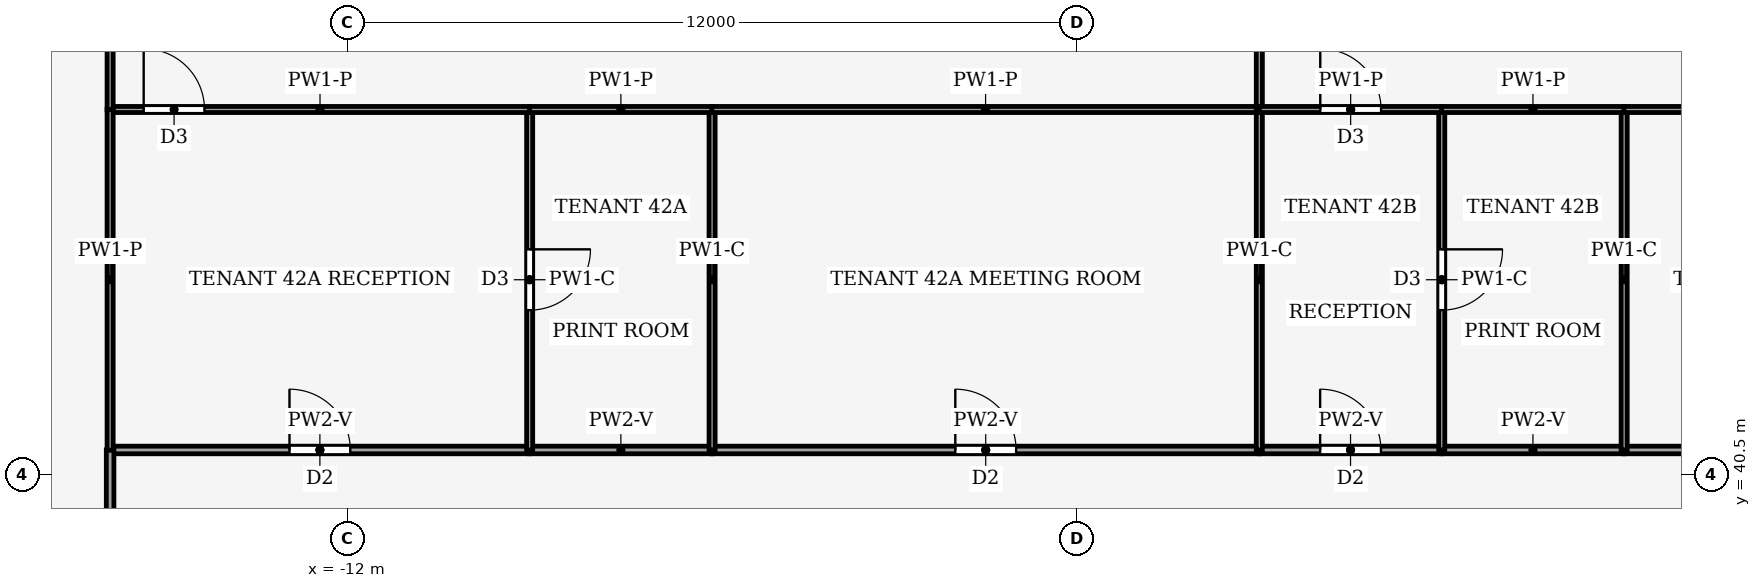
"""IFC4 building model, lengths in metres.
Left out: names, types, materials, properties, quantities, classifications, styles, units other than length and angle.
Written with IfcOpenShell. Run it as: python <this file> out.ifc"""

import sys

from ifc_helpers import new_model, si_unit, direction, frame, frame_2d, origin, place, context, subcontext, project, spatial, rectangle, extrude, element, fill, save


model = new_model("IFC4")
c1 = context("Model", 3, precision=1e-05, world=origin(), true_north=direction((0.0, 1.0)))
c2 = subcontext(c1, "Body", "Model", "MODEL_VIEW")
j1 = project(units=[si_unit("LENGTHUNIT", "METRE"), si_unit("PLANEANGLEUNIT", "RADIAN")], contexts=[c1])
p1 = place(None, origin())
s1 = spatial("IfcSite", under=j1, at=p1, CompositionType="ELEMENT")
p2 = place(p1, origin())
s2 = spatial("IfcBuilding", under=s1, at=p2, CompositionType="ELEMENT")
p3 = place(p2, frame((0.0, 0.0, 186.0)))
s3 = spatial("IfcBuildingStorey", under=s2, at=p3, CompositionType="ELEMENT", Elevation=186.0)
p4 = place(p3, frame((-15.9, 40.9, 0.0), z_axis=(0.0, 0.0, 1.0), x_axis=(1.0, 0.0, 0.0)))
e1 = element("IfcWall", 1, at=p4, inside=s3, PredefinedType="PARTITIONING", context=c2, shape_type="SweptSolid", body=[
    extrude(rectangle(XDim=6.9, YDim=0.125, at=frame_2d((3.45, 0.0))), origin(), (0.0, 0.0, 1.0), 3.44),
])
p5 = place(p4, frame((2.95, 0.0, 0.0)))
e2 = element("IfcOpeningElement", 2, at=p5, cuts=e1, PredefinedType="OPENING", context=c2, shape_type="SweptSolid", body=[
    extrude(rectangle(XDim=1.0, YDim=2.1, at=frame_2d((0.5, 1.05))), frame((0.0, 0.073, 0.0), z_axis=(0.0, -1.0, 0.0), x_axis=(1.0, 0.0, 0.0)), (0.0, 0.0, 1.0), 0.145),
])
p6 = place(p3, frame((-6.0, 40.9, 0.0), z_axis=(0.0, 0.0, 1.0), x_axis=(-1.0, 0.0, 0.0)))
e3 = element("IfcWall", 3, at=p6, inside=s3, PredefinedType="PARTITIONING", context=c2, shape_type="SweptSolid", body=[
    extrude(rectangle(XDim=3.0, YDim=0.125, at=frame_2d((1.5, 0.0))), origin(), (0.0, 0.0, 1.0), 3.44),
])
p7 = place(p3, frame((-6.0, 40.9, 0.0), z_axis=(0.0, 0.0, 1.0), x_axis=(1.0, 0.0, 0.0)))
e4 = element("IfcWall", 4, at=p7, inside=s3, PredefinedType="PARTITIONING", context=c2, shape_type="SweptSolid", body=[
    extrude(rectangle(XDim=9.0, YDim=0.125, at=frame_2d((4.5, 0.0))), origin(), (0.0, 0.0, 1.0), 3.44),
])
p8 = place(p7, frame((4.0, 0.0, 0.0)))
e5 = element("IfcOpeningElement", 5, at=p8, cuts=e4, PredefinedType="OPENING", context=c2, shape_type="SweptSolid", body=[
    extrude(rectangle(XDim=1.0, YDim=2.1, at=frame_2d((0.5, 1.05))), frame((0.0, 0.073, 0.0), z_axis=(0.0, -1.0, 0.0), x_axis=(1.0, 0.0, 0.0)), (0.0, 0.0, 1.0), 0.145),
])
p9 = place(p3, frame((3.0, 40.9, 0.0), z_axis=(0.0, 0.0, 1.0), x_axis=(1.0, 0.0, 0.0)))
e6 = element("IfcWall", 6, at=p9, inside=s3, PredefinedType="PARTITIONING", context=c2, shape_type="SweptSolid", body=[
    extrude(rectangle(XDim=3.0, YDim=0.125, at=frame_2d((1.5, 0.0))), origin(), (0.0, 0.0, 1.0), 3.44),
])
p10 = place(p9, frame((1.0, 0.0, 0.0)))
e7 = element("IfcOpeningElement", 7, at=p10, cuts=e6, PredefinedType="OPENING", context=c2, shape_type="SweptSolid", body=[
    extrude(rectangle(XDim=1.0, YDim=2.1, at=frame_2d((0.5, 1.05))), frame((0.0, 0.073, 0.0), z_axis=(0.0, -1.0, 0.0), x_axis=(1.0, 0.0, 0.0)), (0.0, 0.0, 1.0), 0.145),
])
p11 = place(p3, frame((9.0, 40.9, 0.0), z_axis=(0.0, 0.0, 1.0), x_axis=(-1.0, 0.0, 0.0)))
e8 = element("IfcWall", 8, at=p11, inside=s3, PredefinedType="PARTITIONING", context=c2, shape_type="SweptSolid", body=[
    extrude(rectangle(XDim=3.0, YDim=0.125, at=frame_2d((1.5, 0.0))), origin(), (0.0, 0.0, 1.0), 3.44),
])
p12 = place(p3, frame((9.0, 40.9, 0.0), z_axis=(0.0, 0.0, 1.0), x_axis=(1.0, 0.0, 0.0)))
e9 = element("IfcWall", 9, at=p12, inside=s3, PredefinedType="PARTITIONING", context=c2, shape_type="SweptSolid", body=[
    extrude(rectangle(XDim=6.9, YDim=0.125, at=frame_2d((3.45, 0.0))), origin(), (0.0, 0.0, 1.0), 3.44),
])
p13 = place(p12, frame((2.95, 0.0, 0.0)))
e10 = element("IfcOpeningElement", 10, at=p13, cuts=e9, PredefinedType="OPENING", context=c2, shape_type="SweptSolid", body=[
    extrude(rectangle(XDim=1.0, YDim=2.1, at=frame_2d((0.5, 1.05))), frame((0.0, 0.073, 0.0), z_axis=(0.0, -1.0, 0.0), x_axis=(1.0, 0.0, 0.0)), (0.0, 0.0, 1.0), 0.145),
])
p14 = place(p3, frame((-15.9, 34.5, 0.0), z_axis=(0.0, 0.0, 1.0), x_axis=(0.0, 1.0, 0.0)))
e11 = element("IfcWall", 11, at=p14, inside=s3, PredefinedType="PARTITIONING", context=c2, shape_type="SweptSolid", body=[
    extrude(rectangle(XDim=6.404, YDim=0.125, at=frame_2d((3.202, 0.0))), origin(), (0.0, 0.0, 1.0), 3.14),
])
p15 = place(p14, frame((2.702, 0.0, 0.0)))
e12 = element("IfcOpeningElement", 12, at=p15, cuts=e11, PredefinedType="OPENING", context=c2, shape_type="SweptSolid", body=[
    extrude(rectangle(XDim=1.0, YDim=2.1, at=frame_2d((0.5, 1.05))), frame((0.0, 0.073, 0.0), z_axis=(0.0, -1.0, 0.0), x_axis=(1.0, 0.0, 0.0)), (0.0, 0.0, 1.0), 0.145),
])
p16 = place(p3, frame((-9.0, 46.5, 0.0), z_axis=(0.0, 0.0, 1.0), x_axis=(0.0, -1.0, 0.0)))
e13 = element("IfcWall", 13, at=p16, inside=s3, PredefinedType="PARTITIONING", context=c2, shape_type="SweptSolid", body=[
    extrude(rectangle(XDim=5.6, YDim=0.1, at=frame_2d((2.8, 0.0))), origin(), (0.0, 0.0, 1.0), 3.87),
])
p17 = place(p16, frame((2.3, 0.0, 0.0)))
e14 = element("IfcOpeningElement", 14, at=p17, cuts=e13, PredefinedType="OPENING", context=c2, shape_type="SweptSolid", body=[
    extrude(rectangle(XDim=1.0, YDim=2.1, at=frame_2d((0.5, 1.05))), frame((0.0, 0.06, 0.0), z_axis=(0.0, -1.0, 0.0), x_axis=(1.0, 0.0, 0.0)), (0.0, 0.0, 1.0), 0.12),
])
p18 = place(p3, frame((-15.9, 46.5, 0.0), z_axis=(0.0, 0.0, 1.0), x_axis=(1.0, 0.0, 0.0)))
e15 = element("IfcWall", 15, at=p18, inside=s3, PredefinedType="PARTITIONING", context=c2, shape_type="SweptSolid", body=[
    extrude(rectangle(XDim=6.904, YDim=0.1, at=frame_2d((3.452, 0.0))), origin(), (0.0, 0.0, 1.0), 3.44),
])
p19 = place(p18, frame((0.552, 0.0, 0.0)))
e16 = element("IfcOpeningElement", 16, at=p19, cuts=e15, PredefinedType="OPENING", context=c2, shape_type="SweptSolid", body=[
    extrude(rectangle(XDim=1.0, YDim=2.1, at=frame_2d((0.5, 1.05))), frame((0.0, 0.06, 0.0), z_axis=(0.0, -1.0, 0.0), x_axis=(1.0, 0.0, 0.0)), (0.0, 0.0, 1.0), 0.12),
])
p20 = place(p3, frame((-15.9, 46.504, 0.0), z_axis=(0.0, 0.0, 1.0), x_axis=(0.0, -1.0, 0.0)))
e17 = element("IfcWall", 17, at=p20, inside=s3, PredefinedType="PARTITIONING", context=c2, shape_type="SweptSolid", body=[
    extrude(rectangle(XDim=5.608, YDim=0.1, at=frame_2d((2.804, 0.0))), origin(), (0.0, 0.0, 1.0), 3.44),
])
p21 = place(p3, frame((-6.0, 40.9, 0.0), z_axis=(0.0, 0.0, 1.0), x_axis=(0.0, 1.0, 0.0)))
e18 = element("IfcWall", 18, at=p21, inside=s3, PredefinedType="PARTITIONING", context=c2, shape_type="SweptSolid", body=[
    extrude(rectangle(XDim=5.6, YDim=0.1, at=frame_2d((2.8, 0.0))), origin(), (0.0, 0.0, 1.0), 3.87),
])
p22 = place(p3, frame((-5.996, 46.5, 0.0), z_axis=(0.0, 0.0, 1.0), x_axis=(-1.0, 0.0, 0.0)))
e19 = element("IfcWall", 19, at=p22, inside=s3, PredefinedType="PARTITIONING", context=c2, shape_type="SweptSolid", body=[
    extrude(rectangle(XDim=3.008, YDim=0.1, at=frame_2d((1.504, 0.0))), origin(), (0.0, 0.0, 1.0), 3.44),
])
p23 = place(p3, frame((3.0, 46.5, 0.0), z_axis=(0.0, 0.0, 1.0), x_axis=(-1.0, 0.0, 0.0)))
e20 = element("IfcWall", 20, at=p23, inside=s3, PredefinedType="PARTITIONING", context=c2, shape_type="SweptSolid", body=[
    extrude(rectangle(XDim=9.004, YDim=0.1, at=frame_2d((4.502, 0.0))), origin(), (0.0, 0.0, 1.0), 3.44),
])
p24 = place(p3, frame((3.0, 40.9, 0.0), z_axis=(0.0, 0.0, 1.0), x_axis=(0.0, 1.0, 0.0)))
e21 = element("IfcWall", 21, at=p24, inside=s3, PredefinedType="PARTITIONING", context=c2, shape_type="SweptSolid", body=[
    extrude(rectangle(XDim=5.6, YDim=0.1, at=frame_2d((2.8, 0.0))), origin(), (0.0, 0.0, 1.0), 3.87),
])
p25 = place(p3, frame((3.0, 46.5, 0.0), z_axis=(0.0, 0.0, 1.0), x_axis=(0.0, 1.0, 0.0)))
e22 = element("IfcWall", 22, at=p25, inside=s3, PredefinedType="PARTITIONING", context=c2, shape_type="SweptSolid", body=[
    extrude(rectangle(XDim=15.0, YDim=0.1, at=frame_2d((7.5, 0.0))), origin(), (0.0, 0.0, 1.0), 3.24),
])
p26 = place(p3, frame((-15.9, 61.504, 0.0), z_axis=(0.0, 0.0, 1.0), x_axis=(0.0, -1.0, 0.0)))
e23 = element("IfcWall", 23, at=p26, inside=s3, PredefinedType="PARTITIONING", context=c2, shape_type="SweptSolid", body=[
    extrude(rectangle(XDim=15.008, YDim=0.1, at=frame_2d((7.504, 0.0))), origin(), (0.0, 0.0, 1.0), 3.24),
])
p27 = place(p3, frame((6.0, 46.5, 0.0), z_axis=(0.0, 0.0, 1.0), x_axis=(0.0, -1.0, 0.0)))
e24 = element("IfcWall", 24, at=p27, inside=s3, PredefinedType="PARTITIONING", context=c2, shape_type="SweptSolid", body=[
    extrude(rectangle(XDim=5.6, YDim=0.1, at=frame_2d((2.8, 0.0))), origin(), (0.0, 0.0, 1.0), 3.87),
])
p28 = place(p27, frame((2.3, 0.0, 0.0)))
e25 = element("IfcOpeningElement", 25, at=p28, cuts=e24, PredefinedType="OPENING", context=c2, shape_type="SweptSolid", body=[
    extrude(rectangle(XDim=1.0, YDim=2.1, at=frame_2d((0.5, 1.05))), frame((0.0, 0.06, 0.0), z_axis=(0.0, -1.0, 0.0), x_axis=(1.0, 0.0, 0.0)), (0.0, 0.0, 1.0), 0.12),
])
p29 = place(p3, frame((3.0, 46.5, 0.0), z_axis=(0.0, 0.0, 1.0), x_axis=(1.0, 0.0, 0.0)))
e26 = element("IfcWall", 26, at=p29, inside=s3, PredefinedType="PARTITIONING", context=c2, shape_type="SweptSolid", body=[
    extrude(rectangle(XDim=3.004, YDim=0.1, at=frame_2d((1.502, 0.0))), origin(), (0.0, 0.0, 1.0), 3.44),
])
p30 = place(p29, frame((1.002, 0.0, 0.0)))
e27 = element("IfcOpeningElement", 27, at=p30, cuts=e26, PredefinedType="OPENING", context=c2, shape_type="SweptSolid", body=[
    extrude(rectangle(XDim=1.0, YDim=2.1, at=frame_2d((0.5, 1.05))), frame((0.0, 0.06, 0.0), z_axis=(0.0, -1.0, 0.0), x_axis=(1.0, 0.0, 0.0)), (0.0, 0.0, 1.0), 0.12),
])
p31 = place(p3, frame((9.0, 40.9, 0.0), z_axis=(0.0, 0.0, 1.0), x_axis=(0.0, 1.0, 0.0)))
e28 = element("IfcWall", 28, at=p31, inside=s3, PredefinedType="PARTITIONING", context=c2, shape_type="SweptSolid", body=[
    extrude(rectangle(XDim=5.6, YDim=0.1, at=frame_2d((2.8, 0.0))), origin(), (0.0, 0.0, 1.0), 3.87),
])
p32 = place(p3, frame((9.004, 46.5, 0.0), z_axis=(0.0, 0.0, 1.0), x_axis=(-1.0, 0.0, 0.0)))
e29 = element("IfcWall", 29, at=p32, inside=s3, PredefinedType="PARTITIONING", context=c2, shape_type="SweptSolid", body=[
    extrude(rectangle(XDim=3.008, YDim=0.1, at=frame_2d((1.504, 0.0))), origin(), (0.0, 0.0, 1.0), 3.44),
])
p33 = place(p3, frame((15.9, 46.5, 0.0), z_axis=(0.0, 0.0, 1.0), x_axis=(-1.0, 0.0, 0.0)))
e30 = element("IfcWall", 30, at=p33, inside=s3, PredefinedType="PARTITIONING", context=c2, shape_type="SweptSolid", body=[
    extrude(rectangle(XDim=6.904, YDim=0.1, at=frame_2d((3.452, 0.0))), origin(), (0.0, 0.0, 1.0), 3.44),
])
p34 = place(p5, origin())
e31 = element("IfcDoor", 31, at=p34, inside=s3, OperationType="SINGLE_SWING_LEFT", PredefinedType="DOOR", context=c2, shape_type="SweptSolid", body=[
    extrude(rectangle(XDim=1.0, YDim=2.1, at=frame_2d((0.5, 1.05))), frame((0.0, 0.025, 0.0), z_axis=(0.0, -1.0, 0.0), x_axis=(1.0, 0.0, 0.0)), (0.0, 0.0, 1.0), 0.05),
])
fill(e2, e31)
p35 = place(p8, origin())
e32 = element("IfcDoor", 32, at=p35, inside=s3, OperationType="SINGLE_SWING_RIGHT", PredefinedType="DOOR", context=c2, shape_type="SweptSolid", body=[
    extrude(rectangle(XDim=1.0, YDim=2.1, at=frame_2d((0.5, 1.05))), frame((0.0, 0.025, 0.0), z_axis=(0.0, -1.0, 0.0), x_axis=(1.0, 0.0, 0.0)), (0.0, 0.0, 1.0), 0.05),
])
fill(e5, e32)
p36 = place(p10, origin())
e33 = element("IfcDoor", 33, at=p36, inside=s3, OperationType="SINGLE_SWING_LEFT", PredefinedType="DOOR", context=c2, shape_type="SweptSolid", body=[
    extrude(rectangle(XDim=1.0, YDim=2.1, at=frame_2d((0.5, 1.05))), frame((0.0, 0.025, 0.0), z_axis=(0.0, -1.0, 0.0), x_axis=(1.0, 0.0, 0.0)), (0.0, 0.0, 1.0), 0.05),
])
fill(e7, e33)
p37 = place(p17, origin())
e34 = element("IfcDoor", 34, at=p37, inside=s3, OperationType="SINGLE_SWING_RIGHT", PredefinedType="DOOR", context=c2, shape_type="SweptSolid", body=[
    extrude(rectangle(XDim=1.0, YDim=2.1, at=frame_2d((0.5, 1.05))), frame((0.0, 0.025, 0.0), z_axis=(0.0, -1.0, 0.0), x_axis=(1.0, 0.0, 0.0)), (0.0, 0.0, 1.0), 0.05),
])
fill(e14, e34)
p38 = place(p19, origin())
e35 = element("IfcDoor", 35, at=p38, inside=s3, OperationType="SINGLE_SWING_LEFT", PredefinedType="DOOR", context=c2, shape_type="SweptSolid", body=[
    extrude(rectangle(XDim=1.0, YDim=2.1, at=frame_2d((0.5, 1.05))), frame((0.0, 0.025, 0.0), z_axis=(0.0, -1.0, 0.0), x_axis=(1.0, 0.0, 0.0)), (0.0, 0.0, 1.0), 0.05),
])
fill(e16, e35)
p39 = place(p28, origin())
e36 = element("IfcDoor", 36, at=p39, inside=s3, OperationType="SINGLE_SWING_RIGHT", PredefinedType="DOOR", context=c2, shape_type="SweptSolid", body=[
    extrude(rectangle(XDim=1.0, YDim=2.1, at=frame_2d((0.5, 1.05))), frame((0.0, 0.025, 0.0), z_axis=(0.0, -1.0, 0.0), x_axis=(1.0, 0.0, 0.0)), (0.0, 0.0, 1.0), 0.05),
])
fill(e25, e36)
p40 = place(p30, origin())
e37 = element("IfcDoor", 37, at=p40, inside=s3, OperationType="SINGLE_SWING_LEFT", PredefinedType="DOOR", context=c2, shape_type="SweptSolid", body=[
    extrude(rectangle(XDim=1.0, YDim=2.1, at=frame_2d((0.5, 1.05))), frame((0.0, 0.025, 0.0), z_axis=(0.0, -1.0, 0.0), x_axis=(1.0, 0.0, 0.0)), (0.0, 0.0, 1.0), 0.05),
])
fill(e27, e37)
save(model, sys.argv[1])
